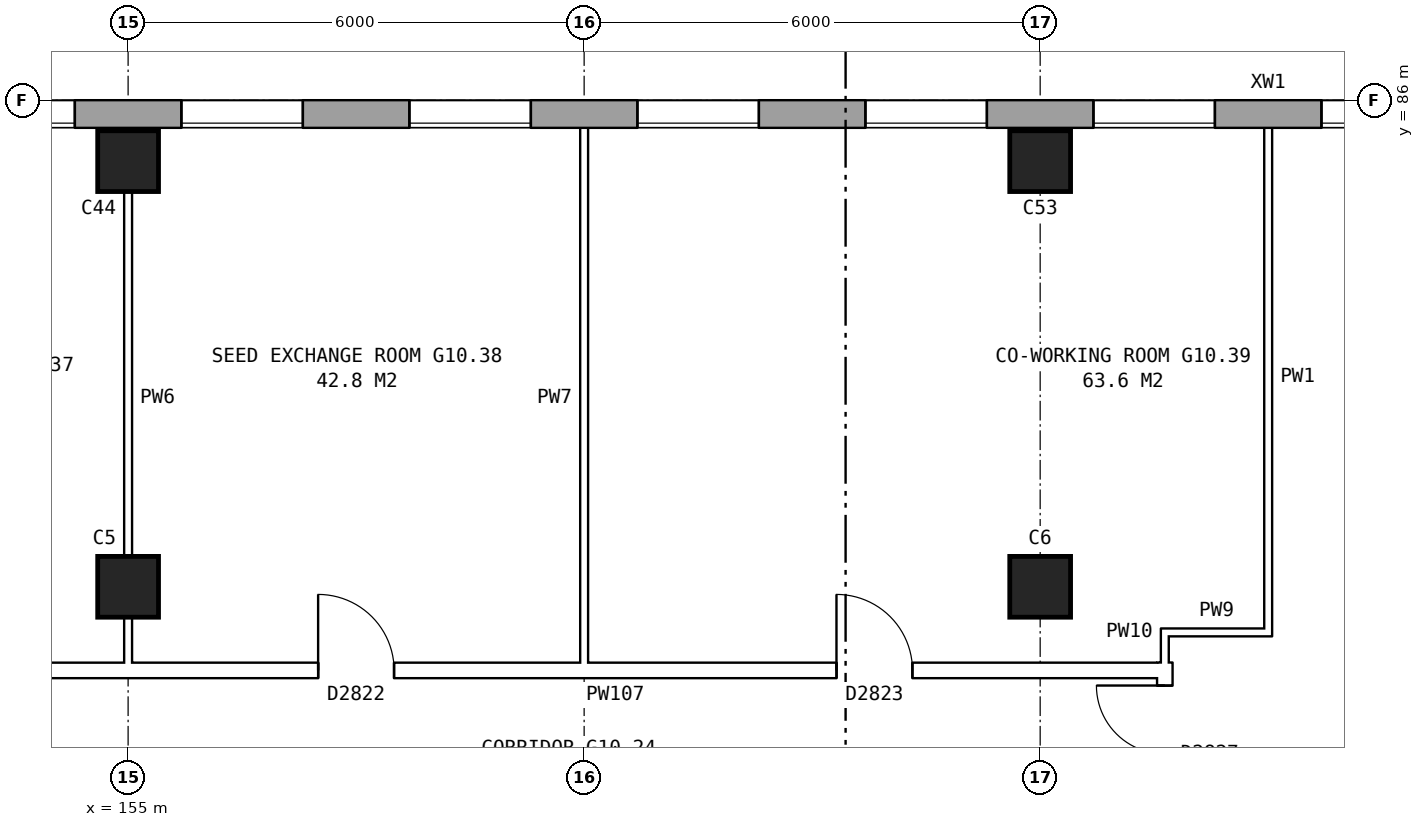
"""IFC4 building model, lengths in metres.
Left out: names, types, materials, properties, quantities, classifications, styles, units other than length and angle.
Written with IfcOpenShell. Run it as: python <this file> out.ifc"""

import sys

from ifc_helpers import new_model, si_unit, direction, frame, frame_2d, origin, origin_2d, place, context, subcontext, project, spatial, rectangle, extrude, element, fill, save


model = new_model("IFC4")
c1 = context("Model", 3, precision=1e-05, world=origin(), true_north=direction((0.0, 1.0)))
c2 = subcontext(c1, "Body", "Model", "MODEL_VIEW")
j1 = project(units=[si_unit("LENGTHUNIT", "METRE"), si_unit("PLANEANGLEUNIT", "RADIAN")], contexts=[c1])
p1 = place(None, origin())
s1 = spatial("IfcSite", under=j1, at=p1, CompositionType="ELEMENT")
p2 = place(p1, origin())
s2 = spatial("IfcBuilding", under=s1, at=p2, CompositionType="ELEMENT")
p3 = place(p2, frame((0.0, 0.0, 38.1)))
s3 = spatial("IfcBuildingStorey", under=s2, at=p3, CompositionType="ELEMENT", Elevation=38.1)
for number, where, z_axis, x_axis in (
    (1, (155.0, 79.6, 0.0), (0.0, 0.0, 1.0), (1.0, 0.0, 0.0)),
    (2, (155.0, 85.2, 0.0), (0.0, 0.0, 1.0), (1.0, 0.0, 0.0)),
    (3, (167.0, 79.6, 0.0), (0.0, 0.0, 1.0), (1.0, 0.0, 0.0)),
    (4, (167.0, 85.2, 0.0), (0.0, 0.0, 1.0), (1.0, 0.0, 0.0)),
):
    element("IfcColumn", number, at=place(p3, frame(where, z_axis=z_axis, x_axis=x_axis)), inside=s3, PredefinedType="COLUMN", context=c2, shape_type="SweptSolid", body=[
        extrude(rectangle(XDim=0.8, YDim=0.8, at=origin_2d()), origin(), (0.0, 0.0, 1.0), 5.6),
    ])
p4 = place(p3, frame((173.425, 85.82, 0.0), z_axis=(0.0, 0.0, 1.0), x_axis=(-1.0, 0.0, 0.0)))
e5 = element("IfcWall", 5, at=p4, inside=s3, PredefinedType="STANDARD", context=c2, shape_type="SweptSolid", body=[
    extrude(rectangle(XDim=39.351, YDim=0.36, at=frame_2d((19.675, 0.0))), origin(), (0.0, 0.0, 1.0), 5.6),
])
p5 = place(p4, frame((1.125, 0.0, 0.15)))
e6 = element("IfcOpeningElement", 6, at=p5, cuts=e5, PredefinedType="OPENING", context=c2, shape_type="SweptSolid", body=[
    extrude(rectangle(XDim=1.6, YDim=2.4, at=frame_2d((0.8, 1.2))), frame((0.0, 0.19, 0.0), z_axis=(0.0, -1.0, 0.0), x_axis=(1.0, 0.0, 0.0)), (0.0, 0.0, 1.0), 0.38),
])
p6 = place(p4, frame((4.125, 0.0, 0.15)))
e7 = element("IfcOpeningElement", 7, at=p6, cuts=e5, PredefinedType="OPENING", context=c2, shape_type="SweptSolid", body=[
    extrude(rectangle(XDim=1.6, YDim=2.4, at=frame_2d((0.8, 1.2))), frame((0.0, 0.19, 0.0), z_axis=(0.0, -1.0, 0.0), x_axis=(1.0, 0.0, 0.0)), (0.0, 0.0, 1.0), 0.38),
])
p7 = place(p4, frame((7.125, 0.0, 0.15)))
e8 = element("IfcOpeningElement", 8, at=p7, cuts=e5, PredefinedType="OPENING", context=c2, shape_type="SweptSolid", body=[
    extrude(rectangle(XDim=1.6, YDim=2.4, at=frame_2d((0.8, 1.2))), frame((0.0, 0.19, 0.0), z_axis=(0.0, -1.0, 0.0), x_axis=(1.0, 0.0, 0.0)), (0.0, 0.0, 1.0), 0.38),
])
p8 = place(p4, frame((10.125, 0.0, 0.15)))
e9 = element("IfcOpeningElement", 9, at=p8, cuts=e5, PredefinedType="OPENING", context=c2, shape_type="SweptSolid", body=[
    extrude(rectangle(XDim=1.6, YDim=2.4, at=frame_2d((0.8, 1.2))), frame((0.0, 0.19, 0.0), z_axis=(0.0, -1.0, 0.0), x_axis=(1.0, 0.0, 0.0)), (0.0, 0.0, 1.0), 0.38),
])
p9 = place(p4, frame((13.125, 0.0, 0.15)))
e10 = element("IfcOpeningElement", 10, at=p9, cuts=e5, PredefinedType="OPENING", context=c2, shape_type="SweptSolid", body=[
    extrude(rectangle(XDim=1.6, YDim=2.4, at=frame_2d((0.8, 1.2))), frame((0.0, 0.19, 0.0), z_axis=(0.0, -1.0, 0.0), x_axis=(1.0, 0.0, 0.0)), (0.0, 0.0, 1.0), 0.38),
])
p10 = place(p4, frame((16.125, 0.0, 0.15)))
e11 = element("IfcOpeningElement", 11, at=p10, cuts=e5, PredefinedType="OPENING", context=c2, shape_type="SweptSolid", body=[
    extrude(rectangle(XDim=1.6, YDim=2.4, at=frame_2d((0.8, 1.2))), frame((0.0, 0.19, 0.0), z_axis=(0.0, -1.0, 0.0), x_axis=(1.0, 0.0, 0.0)), (0.0, 0.0, 1.0), 0.38),
])
p11 = place(p4, frame((19.125, 0.0, 0.15)))
e12 = element("IfcOpeningElement", 12, at=p11, cuts=e5, PredefinedType="OPENING", context=c2, shape_type="SweptSolid", body=[
    extrude(rectangle(XDim=1.6, YDim=2.4, at=frame_2d((0.8, 1.2))), frame((0.0, 0.19, 0.0), z_axis=(0.0, -1.0, 0.0), x_axis=(1.0, 0.0, 0.0)), (0.0, 0.0, 1.0), 0.38),
])
p12 = place(p4, frame((22.125, 0.0, 0.15)))
e13 = element("IfcOpeningElement", 13, at=p12, cuts=e5, PredefinedType="OPENING", context=c2, shape_type="SweptSolid", body=[
    extrude(rectangle(XDim=1.6, YDim=2.4, at=frame_2d((0.8, 1.2))), frame((0.0, 0.19, 0.0), z_axis=(0.0, -1.0, 0.0), x_axis=(1.0, 0.0, 0.0)), (0.0, 0.0, 1.0), 0.38),
])
p13 = place(p4, frame((25.125, 0.0, 0.15)))
e14 = element("IfcOpeningElement", 14, at=p13, cuts=e5, PredefinedType="OPENING", context=c2, shape_type="SweptSolid", body=[
    extrude(rectangle(XDim=1.6, YDim=2.4, at=frame_2d((0.8, 1.2))), frame((0.0, 0.19, 0.0), z_axis=(0.0, -1.0, 0.0), x_axis=(1.0, 0.0, 0.0)), (0.0, 0.0, 1.0), 0.38),
])
p14 = place(p4, frame((28.125, 0.0, 0.15)))
e15 = element("IfcOpeningElement", 15, at=p14, cuts=e5, PredefinedType="OPENING", context=c2, shape_type="SweptSolid", body=[
    extrude(rectangle(XDim=1.6, YDim=2.4, at=frame_2d((0.8, 1.2))), frame((0.0, 0.19, 0.0), z_axis=(0.0, -1.0, 0.0), x_axis=(1.0, 0.0, 0.0)), (0.0, 0.0, 1.0), 0.38),
])
p15 = place(p4, frame((31.125, 0.0, 0.15)))
e16 = element("IfcOpeningElement", 16, at=p15, cuts=e5, PredefinedType="OPENING", context=c2, shape_type="SweptSolid", body=[
    extrude(rectangle(XDim=1.6, YDim=2.4, at=frame_2d((0.8, 1.2))), frame((0.0, 0.19, 0.0), z_axis=(0.0, -1.0, 0.0), x_axis=(1.0, 0.0, 0.0)), (0.0, 0.0, 1.0), 0.38),
])
p16 = place(p4, frame((34.125, 0.0, 0.15)))
e17 = element("IfcOpeningElement", 17, at=p16, cuts=e5, PredefinedType="OPENING", context=c2, shape_type="SweptSolid", body=[
    extrude(rectangle(XDim=1.6, YDim=2.4, at=frame_2d((0.8, 1.2))), frame((0.0, 0.19, 0.0), z_axis=(0.0, -1.0, 0.0), x_axis=(1.0, 0.0, 0.0)), (0.0, 0.0, 1.0), 0.38),
])
p17 = place(p4, frame((37.125, 0.0, 0.15)))
e18 = element("IfcOpeningElement", 18, at=p17, cuts=e5, PredefinedType="OPENING", context=c2, shape_type="SweptSolid", body=[
    extrude(rectangle(XDim=1.6, YDim=2.4, at=frame_2d((0.8, 1.2))), frame((0.0, 0.19, 0.0), z_axis=(0.0, -1.0, 0.0), x_axis=(1.0, 0.0, 0.0)), (0.0, 0.0, 1.0), 0.38),
])
p18 = place(p3, frame((131.24, 78.5, 0.0), z_axis=(0.0, 0.0, 1.0), x_axis=(1.0, 0.0, 0.0)))
e19 = element("IfcWall", 19, at=p18, inside=s3, PredefinedType="PARTITIONING", context=c2, shape_type="SweptSolid", body=[
    extrude(rectangle(XDim=37.5, YDim=0.2, at=frame_2d((18.75, 0.0))), origin(), (0.0, 0.0, 1.0), 5.6),
])
p19 = place(p18, frame((0.99, 0.0, 0.0)))
e20 = element("IfcOpeningElement", 20, at=p19, cuts=e19, PredefinedType="OPENING", context=c2, shape_type="SweptSolid", body=[
    extrude(rectangle(XDim=0.9, YDim=2.1, at=frame_2d((0.45, 1.05))), frame((0.0, 0.11, 0.0), z_axis=(0.0, -1.0, 0.0), x_axis=(1.0, 0.0, 0.0)), (0.0, 0.0, 1.0), 0.22),
])
p20 = place(p18, frame((3.81, 0.0, 0.0)))
e21 = element("IfcOpeningElement", 21, at=p20, cuts=e19, PredefinedType="OPENING", context=c2, shape_type="SweptSolid", body=[
    extrude(rectangle(XDim=0.9, YDim=2.1, at=frame_2d((0.45, 1.05))), frame((0.0, 0.11, 0.0), z_axis=(0.0, -1.0, 0.0), x_axis=(1.0, 0.0, 0.0)), (0.0, 0.0, 1.0), 0.22),
])
p21 = place(p18, frame((6.81, 0.0, 0.0)))
e22 = element("IfcOpeningElement", 22, at=p21, cuts=e19, PredefinedType="OPENING", context=c2, shape_type="SweptSolid", body=[
    extrude(rectangle(XDim=0.9, YDim=2.1, at=frame_2d((0.45, 1.05))), frame((0.0, 0.11, 0.0), z_axis=(0.0, -1.0, 0.0), x_axis=(1.0, 0.0, 0.0)), (0.0, 0.0, 1.0), 0.22),
])
p22 = place(p18, frame((9.76, 0.0, 0.0)))
e23 = element("IfcOpeningElement", 23, at=p22, cuts=e19, PredefinedType="OPENING", context=c2, shape_type="SweptSolid", body=[
    extrude(rectangle(XDim=1.0, YDim=2.1, at=frame_2d((0.5, 1.05))), frame((0.0, 0.11, 0.0), z_axis=(0.0, -1.0, 0.0), x_axis=(1.0, 0.0, 0.0)), (0.0, 0.0, 1.0), 0.22),
])
p23 = place(p18, frame((14.26, 0.0, 0.0)))
e24 = element("IfcOpeningElement", 24, at=p23, cuts=e19, PredefinedType="OPENING", context=c2, shape_type="SweptSolid", body=[
    extrude(rectangle(XDim=1.0, YDim=2.1, at=frame_2d((0.5, 1.05))), frame((0.0, 0.11, 0.0), z_axis=(0.0, -1.0, 0.0), x_axis=(1.0, 0.0, 0.0)), (0.0, 0.0, 1.0), 0.22),
])
p24 = place(p18, frame((20.26, 0.0, 0.0)))
e25 = element("IfcOpeningElement", 25, at=p24, cuts=e19, PredefinedType="OPENING", context=c2, shape_type="SweptSolid", body=[
    extrude(rectangle(XDim=1.0, YDim=2.1, at=frame_2d((0.5, 1.05))), frame((0.0, 0.11, 0.0), z_axis=(0.0, -1.0, 0.0), x_axis=(1.0, 0.0, 0.0)), (0.0, 0.0, 1.0), 0.22),
])
p25 = place(p18, frame((26.26, 0.0, 0.0)))
e26 = element("IfcOpeningElement", 26, at=p25, cuts=e19, PredefinedType="OPENING", context=c2, shape_type="SweptSolid", body=[
    extrude(rectangle(XDim=1.0, YDim=2.1, at=frame_2d((0.5, 1.05))), frame((0.0, 0.11, 0.0), z_axis=(0.0, -1.0, 0.0), x_axis=(1.0, 0.0, 0.0)), (0.0, 0.0, 1.0), 0.22),
])
p26 = place(p18, frame((33.08, 0.0, 0.0)))
e27 = element("IfcOpeningElement", 27, at=p26, cuts=e19, PredefinedType="OPENING", context=c2, shape_type="SweptSolid", body=[
    extrude(rectangle(XDim=1.0, YDim=2.1, at=frame_2d((0.5, 1.05))), frame((0.0, 0.11, 0.0), z_axis=(0.0, -1.0, 0.0), x_axis=(1.0, 0.0, 0.0)), (0.0, 0.0, 1.0), 0.22),
])
p27 = place(p3, frame((168.59, 79.0, 0.0), z_axis=(0.0, 0.0, 1.0), x_axis=(1.0, 0.0, 0.0)))
e28 = element("IfcWall", 28, at=p27, inside=s3, PredefinedType="PARTITIONING", context=c2, shape_type="SweptSolid", body=[
    extrude(rectangle(XDim=1.46, YDim=0.1, at=frame_2d((0.73, 0.0))), origin(), (0.0, 0.0, 1.0), 5.6),
])
for number, where, z_axis, x_axis in (
    (29, (155.0, 78.4, 0.0), (0.0, 0.0, 1.0), (0.0, 1.0, 0.0)),
    (30, (161.0, 78.4, 0.0), (0.0, 0.0, 1.0), (0.0, 1.0, 0.0)),
):
    element("IfcWall", number, at=place(p3, frame(where, z_axis=z_axis, x_axis=x_axis)), inside=s3, PredefinedType="PARTITIONING", context=c2, shape_type="SweptSolid", body=[
        extrude(rectangle(XDim=7.36, YDim=0.1, at=frame_2d((3.68, 0.0))), origin(), (0.0, 0.0, 1.0), 5.6),
    ])
p28 = place(p3, frame((168.64, 76.2, 0.0), z_axis=(0.0, 0.0, 1.0), x_axis=(0.0, 1.0, 0.0)))
e31 = element("IfcWall", 31, at=p28, inside=s3, PredefinedType="PARTITIONING", context=c2, shape_type="SweptSolid", body=[
    extrude(rectangle(XDim=2.402, YDim=0.2, at=frame_2d((1.201, 0.0))), origin(), (0.0, 0.0, 1.0), 5.6),
])
p29 = place(p28, frame((0.301, 0.0, 0.0)))
e32 = element("IfcOpeningElement", 32, at=p29, cuts=e31, PredefinedType="OPENING", context=c2, shape_type="SweptSolid", body=[
    extrude(rectangle(XDim=1.8, YDim=2.1, at=frame_2d((0.9, 1.05))), frame((0.0, 0.11, 0.0), z_axis=(0.0, -1.0, 0.0), x_axis=(1.0, 0.0, 0.0)), (0.0, 0.0, 1.0), 0.22),
])
p30 = place(p3, frame((168.64, 78.4, 0.0), z_axis=(0.0, 0.0, 1.0), x_axis=(0.0, 1.0, 0.0)))
e33 = element("IfcWall", 33, at=p30, inside=s3, PredefinedType="PARTITIONING", context=c2, shape_type="SweptSolid", body=[
    extrude(rectangle(XDim=0.65, YDim=0.1, at=frame_2d((0.325, 0.0))), origin(), (0.0, 0.0, 1.0), 5.6),
])
p31 = place(p3, frame((170.0, 78.95, 0.0), z_axis=(0.0, 0.0, 1.0), x_axis=(0.0, 1.0, 0.0)))
e34 = element("IfcWall", 34, at=p31, inside=s3, PredefinedType="PARTITIONING", context=c2, shape_type="SweptSolid", body=[
    extrude(rectangle(XDim=6.81, YDim=0.1, at=frame_2d((3.405, 0.0))), origin(), (0.0, 0.0, 1.0), 5.6),
])
p32 = place(p5, origin())
e35 = element("IfcWindow", 35, at=p32, inside=s3, PartitioningType="SINGLE_PANEL", PredefinedType="WINDOW", context=c2, shape_type="SweptSolid", body=[
    extrude(rectangle(XDim=1.6, YDim=2.4, at=frame_2d((0.8, 1.2))), frame((0.0, 0.15, 0.0), z_axis=(0.0, -1.0, 0.0), x_axis=(1.0, 0.0, 0.0)), (0.0, 0.0, 1.0), 0.06),
])
fill(e6, e35)
p33 = place(p6, origin())
e36 = element("IfcWindow", 36, at=p33, inside=s3, PartitioningType="SINGLE_PANEL", PredefinedType="WINDOW", context=c2, shape_type="SweptSolid", body=[
    extrude(rectangle(XDim=1.6, YDim=2.4, at=frame_2d((0.8, 1.2))), frame((0.0, 0.15, 0.0), z_axis=(0.0, -1.0, 0.0), x_axis=(1.0, 0.0, 0.0)), (0.0, 0.0, 1.0), 0.06),
])
fill(e7, e36)
p34 = place(p7, origin())
e37 = element("IfcWindow", 37, at=p34, inside=s3, PartitioningType="SINGLE_PANEL", PredefinedType="WINDOW", context=c2, shape_type="SweptSolid", body=[
    extrude(rectangle(XDim=1.6, YDim=2.4, at=frame_2d((0.8, 1.2))), frame((0.0, 0.15, 0.0), z_axis=(0.0, -1.0, 0.0), x_axis=(1.0, 0.0, 0.0)), (0.0, 0.0, 1.0), 0.06),
])
fill(e8, e37)
p35 = place(p8, origin())
e38 = element("IfcWindow", 38, at=p35, inside=s3, PartitioningType="SINGLE_PANEL", PredefinedType="WINDOW", context=c2, shape_type="SweptSolid", body=[
    extrude(rectangle(XDim=1.6, YDim=2.4, at=frame_2d((0.8, 1.2))), frame((0.0, 0.15, 0.0), z_axis=(0.0, -1.0, 0.0), x_axis=(1.0, 0.0, 0.0)), (0.0, 0.0, 1.0), 0.06),
])
fill(e9, e38)
p36 = place(p9, origin())
e39 = element("IfcWindow", 39, at=p36, inside=s3, PartitioningType="SINGLE_PANEL", PredefinedType="WINDOW", context=c2, shape_type="SweptSolid", body=[
    extrude(rectangle(XDim=1.6, YDim=2.4, at=frame_2d((0.8, 1.2))), frame((0.0, 0.15, 0.0), z_axis=(0.0, -1.0, 0.0), x_axis=(1.0, 0.0, 0.0)), (0.0, 0.0, 1.0), 0.06),
])
fill(e10, e39)
p37 = place(p10, origin())
e40 = element("IfcWindow", 40, at=p37, inside=s3, PartitioningType="SINGLE_PANEL", PredefinedType="WINDOW", context=c2, shape_type="SweptSolid", body=[
    extrude(rectangle(XDim=1.6, YDim=2.4, at=frame_2d((0.8, 1.2))), frame((0.0, 0.15, 0.0), z_axis=(0.0, -1.0, 0.0), x_axis=(1.0, 0.0, 0.0)), (0.0, 0.0, 1.0), 0.06),
])
fill(e11, e40)
p38 = place(p11, origin())
e41 = element("IfcWindow", 41, at=p38, inside=s3, PartitioningType="SINGLE_PANEL", PredefinedType="WINDOW", context=c2, shape_type="SweptSolid", body=[
    extrude(rectangle(XDim=1.6, YDim=2.4, at=frame_2d((0.8, 1.2))), frame((0.0, 0.15, 0.0), z_axis=(0.0, -1.0, 0.0), x_axis=(1.0, 0.0, 0.0)), (0.0, 0.0, 1.0), 0.06),
])
fill(e12, e41)
p39 = place(p25, origin())
e42 = element("IfcDoor", 42, at=p39, inside=s3, OperationType="SINGLE_SWING_LEFT", PredefinedType="DOOR", context=c2, shape_type="SweptSolid", body=[
    extrude(rectangle(XDim=1.0, YDim=2.1, at=frame_2d((0.5, 1.05))), frame((0.0, 0.025, 0.0), z_axis=(0.0, -1.0, 0.0), x_axis=(1.0, 0.0, 0.0)), (0.0, 0.0, 1.0), 0.05),
])
fill(e26, e42)
p40 = place(p26, origin())
e43 = element("IfcDoor", 43, at=p40, inside=s3, OperationType="SINGLE_SWING_LEFT", PredefinedType="DOOR", context=c2, shape_type="SweptSolid", body=[
    extrude(rectangle(XDim=1.0, YDim=2.1, at=frame_2d((0.5, 1.05))), frame((0.0, 0.025, 0.0), z_axis=(0.0, -1.0, 0.0), x_axis=(1.0, 0.0, 0.0)), (0.0, 0.0, 1.0), 0.05),
])
fill(e27, e43)
p41 = place(p29, origin())
e44 = element("IfcDoor", 44, at=p41, inside=s3, OperationType="DOUBLE_DOOR_SINGLE_SWING", PredefinedType="DOOR", context=c2, shape_type="SweptSolid", body=[
    extrude(rectangle(XDim=1.8, YDim=2.1, at=frame_2d((0.9, 1.05))), frame((0.0, 0.025, 0.0), z_axis=(0.0, -1.0, 0.0), x_axis=(1.0, 0.0, 0.0)), (0.0, 0.0, 1.0), 0.05),
])
fill(e32, e44)
save(model, sys.argv[1])
